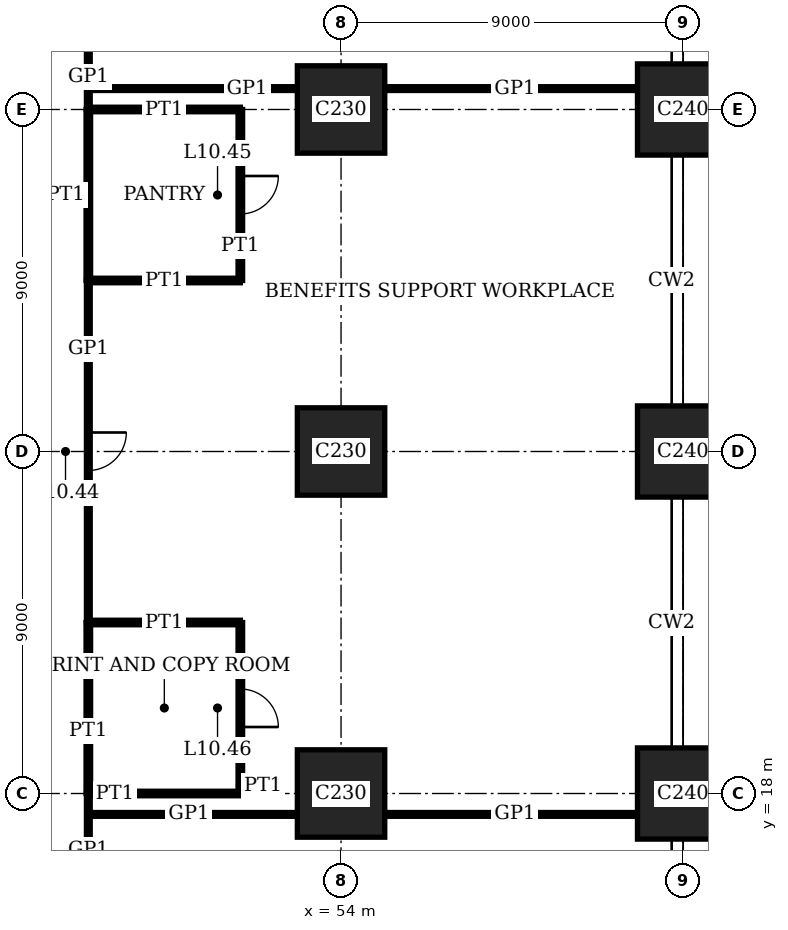
"""IFC4 building model, lengths in metres.
Left out: names, types, materials, properties, quantities, classifications, styles, units other than length and angle.
Written with IfcOpenShell. Run it as: python <this file> out.ifc"""

import sys

from ifc_helpers import new_model, si_unit, direction, frame, frame_2d, origin, origin_2d, place, context, subcontext, project, spatial, rectangle, extrude, element, fill, save


model = new_model("IFC4")
c1 = context("Model", 3, precision=1e-05, world=origin(), true_north=direction((0.0, 1.0)))
c2 = subcontext(c1, "Body", "Model", "MODEL_VIEW")
j1 = project(units=[si_unit("LENGTHUNIT", "METRE"), si_unit("PLANEANGLEUNIT", "RADIAN")], contexts=[c1])
p1 = place(None, origin())
s1 = spatial("IfcSite", under=j1, at=p1, CompositionType="ELEMENT")
p2 = place(p1, origin())
s2 = spatial("IfcBuilding", under=s1, at=p2, CompositionType="ELEMENT")
p3 = place(p2, frame((0.0, 0.0, 43.8)))
s3 = spatial("IfcBuildingStorey", under=s2, at=p3, CompositionType="ELEMENT", Elevation=43.8)
for number, where, z_axis, x_axis in (
    (1, (54.0, 18.0, 0.0), (0.0, 0.0, 1.0), (1.0, 0.0, 0.0)),
    (2, (54.0, 27.0, 0.0), (0.0, 0.0, 1.0), (1.0, 0.0, 0.0)),
    (3, (54.0, 36.0, 0.0), (0.0, 0.0, 1.0), (1.0, 0.0, 0.0)),
):
    element("IfcColumn", number, at=place(p3, frame(where, z_axis=z_axis, x_axis=x_axis)), inside=s3, PredefinedType="COLUMN", context=c2, shape_type="SweptSolid", body=[
        extrude(rectangle(XDim=2.3, YDim=2.3, at=origin_2d()), origin(), (0.0, 0.0, 1.0), 4.0),
    ])
for number, where, z_axis, x_axis in (
    (4, (63.0, 18.0, 0.0), (0.0, 0.0, 1.0), (1.0, 0.0, 0.0)),
    (5, (63.0, 27.0, 0.0), (0.0, 0.0, 1.0), (1.0, 0.0, 0.0)),
    (6, (63.0, 36.0, 0.0), (0.0, 0.0, 1.0), (1.0, 0.0, 0.0)),
):
    element("IfcColumn", number, at=place(p3, frame(where, z_axis=z_axis, x_axis=x_axis)), inside=s3, PredefinedType="COLUMN", context=c2, shape_type="SweptSolid", body=[
        extrude(rectangle(XDim=2.4, YDim=2.4, at=origin_2d()), origin(), (0.0, 0.0, 1.0), 4.0),
    ])
p4 = place(p3, frame((47.35, 17.45, 0.0), z_axis=(0.0, 0.0, 1.0), x_axis=(1.0, 0.0, 0.0)))
e7 = element("IfcWall", 7, at=p4, inside=s3, PredefinedType="PARTITIONING", context=c2, shape_type="SweptSolid", body=[
    extrude(rectangle(XDim=5.5, YDim=0.1, at=frame_2d((2.75, 0.0))), origin(), (0.0, 0.0, 1.0), 3.75),
])
p5 = place(p3, frame((55.15, 17.45, 0.0), z_axis=(0.0, 0.0, 1.0), x_axis=(1.0, 0.0, 0.0)))
e8 = element("IfcWall", 8, at=p5, inside=s3, PredefinedType="PARTITIONING", context=c2, shape_type="SweptSolid", body=[
    extrude(rectangle(XDim=6.65, YDim=0.1, at=frame_2d((3.325, 0.0))), origin(), (0.0, 0.0, 1.0), 3.75),
])
p6 = place(p3, frame((47.35, 18.0, 0.0), z_axis=(0.0, 0.0, 1.0), x_axis=(1.0, 0.0, 0.0)))
e9 = element("IfcWall", 9, at=p6, inside=s3, PredefinedType="PARTITIONING", context=c2, shape_type="SweptSolid", body=[
    extrude(rectangle(XDim=4.0, YDim=0.12, at=frame_2d((2.0, 0.0))), origin(), (0.0, 0.0, 1.0), 3.05),
])
for number, where, z_axis, x_axis in (
    (10, (47.35, 22.5, 0.0), (0.0, 0.0, 1.0), (1.0, 0.0, 0.0)),
    (11, (47.35, 31.5, 0.0), (0.0, 0.0, 1.0), (1.0, 0.0, 0.0)),
):
    element("IfcWall", number, at=place(p3, frame(where, z_axis=z_axis, x_axis=x_axis)), inside=s3, PredefinedType="PARTITIONING", context=c2, shape_type="SweptSolid", body=[
        extrude(rectangle(XDim=4.0, YDim=0.12, at=frame_2d((2.0, 0.0))), origin(), (0.0, 0.0, 1.0), 3.1),
    ])
p7 = place(p3, frame((47.35, 36.0, 0.0), z_axis=(0.0, 0.0, 1.0), x_axis=(1.0, 0.0, 0.0)))
e12 = element("IfcWall", 12, at=p7, inside=s3, PredefinedType="PARTITIONING", context=c2, shape_type="SweptSolid", body=[
    extrude(rectangle(XDim=4.0, YDim=0.12, at=frame_2d((2.0, 0.0))), origin(), (0.0, 0.0, 1.0), 3.05),
])
p8 = place(p3, frame((47.35, 36.55, 0.0), z_axis=(0.0, 0.0, 1.0), x_axis=(1.0, 0.0, 0.0)))
e13 = element("IfcWall", 13, at=p8, inside=s3, PredefinedType="PARTITIONING", context=c2, shape_type="SweptSolid", body=[
    extrude(rectangle(XDim=5.5, YDim=0.1, at=frame_2d((2.75, 0.0))), origin(), (0.0, 0.0, 1.0), 3.75),
])
p9 = place(p3, frame((55.15, 36.55, 0.0), z_axis=(0.0, 0.0, 1.0), x_axis=(1.0, 0.0, 0.0)))
e14 = element("IfcWall", 14, at=p9, inside=s3, PredefinedType="PARTITIONING", context=c2, shape_type="SweptSolid", body=[
    extrude(rectangle(XDim=6.65, YDim=0.1, at=frame_2d((3.325, 0.0))), origin(), (0.0, 0.0, 1.0), 3.75),
])
for number, where, z_axis, x_axis in (
    (15, (47.35, 31.5, 0.0), (0.0, 0.0, 1.0), (0.0, 1.0, 0.0)),
    (16, (47.35, 18.0, 0.0), (0.0, 0.0, 1.0), (0.0, 1.0, 0.0)),
):
    element("IfcWall", number, at=place(p3, frame(where, z_axis=z_axis, x_axis=x_axis)), inside=s3, PredefinedType="PARTITIONING", context=c2, shape_type="SweptSolid", body=[
        extrude(rectangle(XDim=4.5, YDim=0.12, at=frame_2d((2.25, 0.0))), origin(), (0.0, 0.0, 1.0), 3.75),
    ])
p10 = place(p3, frame((47.35, 15.65, 0.0), z_axis=(0.0, 0.0, 1.0), x_axis=(0.0, 1.0, 0.0)))
e17 = element("IfcWall", 17, at=p10, inside=s3, PredefinedType="PARTITIONING", context=c2, shape_type="SweptSolid", body=[
    extrude(rectangle(XDim=2.35, YDim=0.1, at=frame_2d((1.175, 0.0))), origin(), (0.0, 0.0, 1.0), 3.75),
])
p11 = place(p3, frame((47.35, 22.5, 0.0), z_axis=(0.0, 0.0, 1.0), x_axis=(0.0, 1.0, 0.0)))
e18 = element("IfcWall", 18, at=p11, inside=s3, PredefinedType="PARTITIONING", context=c2, shape_type="SweptSolid", body=[
    extrude(rectangle(XDim=9.0, YDim=0.1, at=frame_2d((4.5, 0.0))), origin(), (0.0, 0.0, 1.0), 3.75),
])
p12 = place(p11, frame((4.0, 0.0, 0.0)))
e19 = element("IfcOpeningElement", 19, at=p12, cuts=e18, PredefinedType="OPENING", context=c2, shape_type="SweptSolid", body=[
    extrude(rectangle(XDim=1.0, YDim=2.4, at=frame_2d((0.5, 1.2))), frame((0.0, 0.06, 0.0), z_axis=(0.0, -1.0, 0.0), x_axis=(1.0, 0.0, 0.0)), (0.0, 0.0, 1.0), 0.12),
])
p13 = place(p3, frame((47.35, 36.0, 0.0), z_axis=(0.0, 0.0, 1.0), x_axis=(0.0, 1.0, 0.0)))
e20 = element("IfcWall", 20, at=p13, inside=s3, PredefinedType="PARTITIONING", context=c2, shape_type="SweptSolid", body=[
    extrude(rectangle(XDim=2.35, YDim=0.1, at=frame_2d((1.175, 0.0))), origin(), (0.0, 0.0, 1.0), 3.75),
])
p14 = place(p3, frame((51.35, 31.5, 0.0), z_axis=(0.0, 0.0, 1.0), x_axis=(0.0, 1.0, 0.0)))
e21 = element("IfcWall", 21, at=p14, inside=s3, PredefinedType="PARTITIONING", context=c2, shape_type="SweptSolid", body=[
    extrude(rectangle(XDim=4.5, YDim=0.12, at=frame_2d((2.25, 0.0))), origin(), (0.0, 0.0, 1.0), 3.75),
])
p15 = place(p14, frame((1.75, 0.0, 0.0)))
e22 = element("IfcOpeningElement", 22, at=p15, cuts=e21, PredefinedType="OPENING", context=c2, shape_type="SweptSolid", body=[
    extrude(rectangle(XDim=1.0, YDim=2.4, at=frame_2d((0.5, 1.2))), frame((0.0, 0.07, 0.0), z_axis=(0.0, -1.0, 0.0), x_axis=(1.0, 0.0, 0.0)), (0.0, 0.0, 1.0), 0.14),
])
p16 = place(p3, frame((51.35, 18.0, 0.0), z_axis=(0.0, 0.0, 1.0), x_axis=(0.0, 1.0, 0.0)))
e23 = element("IfcWall", 23, at=p16, inside=s3, PredefinedType="PARTITIONING", context=c2, shape_type="SweptSolid", body=[
    extrude(rectangle(XDim=4.5, YDim=0.12, at=frame_2d((2.25, 0.0))), origin(), (0.0, 0.0, 1.0), 3.75),
])
p17 = place(p16, frame((1.75, 0.0, 0.0)))
e24 = element("IfcOpeningElement", 24, at=p17, cuts=e23, PredefinedType="OPENING", context=c2, shape_type="SweptSolid", body=[
    extrude(rectangle(XDim=1.0, YDim=2.4, at=frame_2d((0.5, 1.2))), frame((0.0, 0.07, 0.0), z_axis=(0.0, -1.0, 0.0), x_axis=(1.0, 0.0, 0.0)), (0.0, 0.0, 1.0), 0.14),
])
p18 = place(p12, origin())
e25 = element("IfcDoor", 25, at=p18, inside=s3, OperationType="SINGLE_SWING_RIGHT", PredefinedType="DOOR", context=c2, shape_type="SweptSolid", body=[
    extrude(rectangle(XDim=1.0, YDim=2.4, at=frame_2d((0.5, 1.2))), frame((0.0, 0.02, 0.0), z_axis=(0.0, -1.0, 0.0), x_axis=(1.0, 0.0, 0.0)), (0.0, 0.0, 1.0), 0.04),
])
fill(e19, e25)
p19 = place(p15, origin())
e26 = element("IfcDoor", 26, at=p19, inside=s3, OperationType="SINGLE_SWING_RIGHT", PredefinedType="DOOR", context=c2, shape_type="SweptSolid", body=[
    extrude(rectangle(XDim=1.0, YDim=2.4, at=frame_2d((0.5, 1.2))), frame((0.0, 0.025, 0.0), z_axis=(0.0, -1.0, 0.0), x_axis=(1.0, 0.0, 0.0)), (0.0, 0.0, 1.0), 0.05),
])
fill(e22, e26)
p20 = place(p17, origin())
e27 = element("IfcDoor", 27, at=p20, inside=s3, OperationType="SINGLE_SWING_LEFT", PredefinedType="DOOR", context=c2, shape_type="SweptSolid", body=[
    extrude(rectangle(XDim=1.0, YDim=2.4, at=frame_2d((0.5, 1.2))), frame((0.0, 0.025, 0.0), z_axis=(0.0, -1.0, 0.0), x_axis=(1.0, 0.0, 0.0)), (0.0, 0.0, 1.0), 0.05),
])
fill(e24, e27)
save(model, sys.argv[1])
